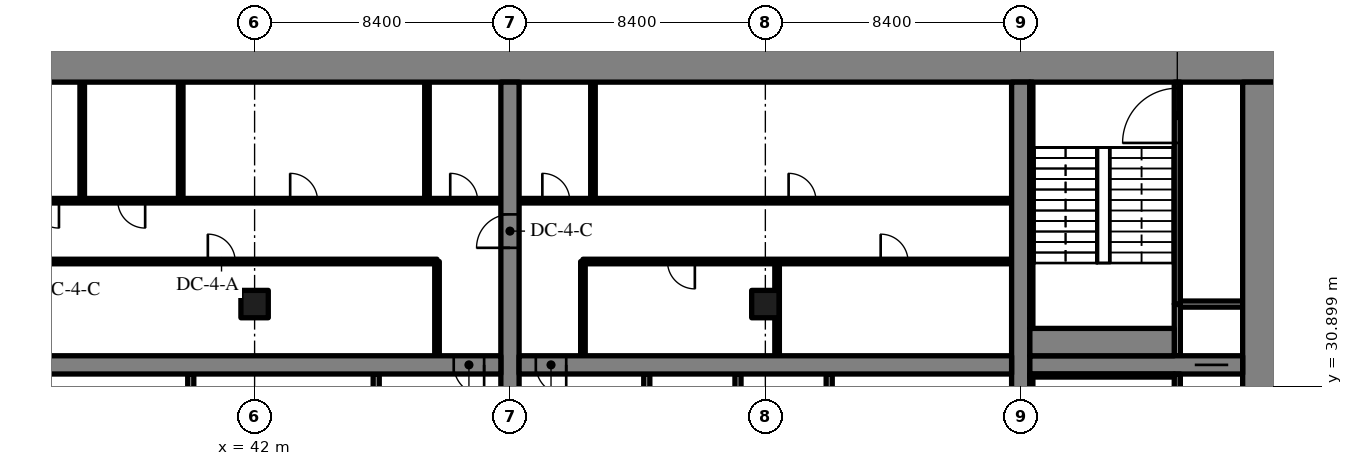
"""IFC4 building model, lengths in metres.
Left out: names, types, materials, properties, quantities, classifications, styles, units other than length and angle.
Written with IfcOpenShell. Run it as: python <this file> out.ifc"""

import sys

from ifc_helpers import new_model, si_unit, direction, frame, frame_2d, origin, origin_2d, place, context, subcontext, project, spatial, rectangle, extrude, source, transform, mapped, element, fill, save


model = new_model("IFC4")
c1 = context("Model", 3, precision=1e-05, world=origin(), true_north=direction((0.0, 1.0)))
c2 = subcontext(c1, "Body", "Model", "MODEL_VIEW")
j1 = project(units=[si_unit("LENGTHUNIT", "METRE"), si_unit("PLANEANGLEUNIT", "RADIAN")], contexts=[c1])
p1 = place(None, origin())
s1 = spatial("IfcSite", under=j1, at=p1, CompositionType="ELEMENT")
p2 = place(p1, origin())
s2 = spatial("IfcBuilding", under=s1, at=p2, CompositionType="ELEMENT")
p3 = place(p2, frame((0.0, 0.0, -9.0)))
s3 = spatial("IfcBuildingStorey", under=s2, at=p3, CompositionType="ELEMENT", Elevation=-9.0)
m1 = source(origin(), c2, "Body", "SweptSolid", [
    extrude(rectangle(XDim=50.4, YDim=1.1, at=frame_2d((25.2, 0.0))), origin(), (0.0, 0.0, 1.0), 4.22),
])
p4 = place(p3, frame((25.2, 41.45, 0.0), z_axis=(0.0, 0.0, 1.0), x_axis=(1.0, 0.0, 0.0)))
e1 = element("IfcWall", 1, at=p4, inside=s3, PredefinedType="SHEAR", context=c2, shape_type="MappedRepresentation", body=[
    mapped(m1, transform((0.0, 0.0, 0.0), scale=1.0)),
])
m2 = source(origin(), c2, "Body", "SweptSolid", [
    extrude(rectangle(XDim=17.8, YDim=1.1, at=frame_2d((8.9, 0.0))), origin(), (0.0, 0.0, 1.0), 4.22),
])
p5 = place(p3, frame((75.05, 23.1, 0.0), z_axis=(0.0, 0.0, 1.0), x_axis=(0.0, 1.0, 0.0)))
e2 = element("IfcWall", 2, at=p5, inside=s3, PredefinedType="SHEAR", context=c2, shape_type="MappedRepresentation", body=[
    mapped(m2, transform((0.0, 0.0, 0.0), scale=1.0)),
])
m3 = source(origin(), c2, "Body", "SweptSolid", [
    extrude(rectangle(XDim=17.8, YDim=0.6, at=frame_2d((8.9, 0.0))), origin(), (0.0, 0.0, 1.0), 4.22),
])
p6 = place(p3, frame((50.4, 23.1, 0.0), z_axis=(0.0, 0.0, 1.0), x_axis=(0.0, 1.0, 0.0)))
e3 = element("IfcWall", 3, at=p6, inside=s3, PredefinedType="SHEAR", context=c2, shape_type="MappedRepresentation", body=[
    mapped(m3, transform((0.0, 0.0, 0.0), scale=1.0)),
])
m4 = source(origin(), c2, "Body", "SweptSolid", [
    extrude(rectangle(XDim=1.1, YDim=2.1, at=frame_2d((0.55, 1.05))), frame((0.0, 0.31, 0.0), z_axis=(0.0, -1.0, 0.0), x_axis=(1.0, 0.0, 0.0)), (0.0, 0.0, 1.0), 0.62),
])
p7 = place(p6, frame((12.35, 0.0, 0.0)))
e4 = element("IfcOpeningElement", 4, at=p7, cuts=e3, PredefinedType="OPENING", context=c2, shape_type="MappedRepresentation", body=[
    mapped(m4, transform((0.0, 0.0, 0.0), scale=1.0)),
])
p8 = place(p3, frame((67.2, 23.1, 0.0), z_axis=(0.0, 0.0, 1.0), x_axis=(0.0, 1.0, 0.0)))
e5 = element("IfcWall", 5, at=p8, inside=s3, PredefinedType="SHEAR", context=c2, shape_type="MappedRepresentation", body=[
    mapped(m3, transform((0.0, 0.0, 0.0), scale=1.0)),
])
m5 = source(origin(), c2, "Body", "SweptSolid", [
    extrude(rectangle(XDim=16.2, YDim=0.6, at=frame_2d((8.1, 0.0))), origin(), (0.0, 0.0, 1.0), 4.22),
])
p9 = place(p3, frame((33.9, 31.6, 0.0), z_axis=(0.0, 0.0, 1.0), x_axis=(1.0, 0.0, 0.0)))
e6 = element("IfcWall", 6, at=p9, inside=s3, PredefinedType="SHEAR", context=c2, shape_type="MappedRepresentation", body=[
    mapped(m5, transform((0.0, 0.0, 0.0), scale=1.0)),
])
m6 = source(origin(), c2, "Body", "SweptSolid", [
    extrude(rectangle(XDim=1.0, YDim=2.1, at=frame_2d((0.5, 1.05))), frame((0.0, 0.31, 0.0), z_axis=(0.0, -1.0, 0.0), x_axis=(1.0, 0.0, 0.0)), (0.0, 0.0, 1.0), 0.62),
])
p10 = place(p9, frame((14.65, 0.0, 0.0)))
e7 = element("IfcOpeningElement", 7, at=p10, cuts=e6, PredefinedType="OPENING", context=c2, shape_type="MappedRepresentation", body=[
    mapped(m6, transform((0.0, 0.0, 0.0), scale=1.0)),
])
m7 = source(origin(), c2, "Body", "SweptSolid", [
    extrude(rectangle(XDim=16.2, YDim=0.6, at=frame_2d((8.1, 0.0))), origin(), (0.0, 0.0, 1.0), 4.22),
])
p11 = place(p3, frame((50.7, 31.6, 0.0), z_axis=(0.0, 0.0, 1.0), x_axis=(1.0, 0.0, 0.0)))
e8 = element("IfcWall", 8, at=p11, inside=s3, PredefinedType="SHEAR", context=c2, shape_type="MappedRepresentation", body=[
    mapped(m7, transform((0.0, 0.0, 0.0), scale=1.0)),
])
p12 = place(p11, frame((0.55, 0.0, 0.0)))
e9 = element("IfcOpeningElement", 9, at=p12, cuts=e8, PredefinedType="OPENING", context=c2, shape_type="MappedRepresentation", body=[
    mapped(m6, transform((0.0, 0.0, 0.0), scale=1.0)),
])
m8 = source(origin(), c2, "Body", "SweptSolid", [
    extrude(rectangle(XDim=7.0, YDim=0.6, at=frame_2d((3.5, 0.0))), origin(), (0.0, 0.0, 1.0), 4.22),
])
p13 = place(p3, frame((67.5, 31.6, 0.0), z_axis=(0.0, 0.0, 1.0), x_axis=(1.0, 0.0, 0.0)))
e10 = element("IfcWall", 10, at=p13, inside=s3, PredefinedType="SHEAR", context=c2, shape_type="MappedRepresentation", body=[
    mapped(m8, transform((0.0, 0.0, 0.0), scale=1.0)),
])
p14 = place(p13, frame((5.425, 0.0, 0.0)))
e11 = element("IfcOpeningElement", 11, at=p14, cuts=e10, PredefinedType="OPENING", context=c2, shape_type="MappedRepresentation", body=[
    mapped(m4, transform((0.0, 0.0, 0.0), scale=1.0)),
])
m9 = source(origin(), c2, "Body", "SweptSolid", [
    extrude(rectangle(XDim=0.9, YDim=0.9, at=origin_2d()), origin(), (0.0, 0.0, 1.0), 4.22),
])
for number, where, z_axis, x_axis in (
    (12, (42.0, 33.6, 0.0), (0.0, 0.0, 1.0), (1.0, 0.0, 0.0)),
    (13, (58.8, 33.6, 0.0), (0.0, 0.0, 1.0), (1.0, 0.0, 0.0)),
):
    element("IfcColumn", number, at=place(p3, frame(where, z_axis=z_axis, x_axis=x_axis)), inside=s3, PredefinedType="COLUMN", context=c2, shape_type="MappedRepresentation", body=[
        mapped(m9, transform((0.0, 0.0, 0.0), scale=1.0)),
    ])
m10 = source(origin(), c2, "Body", "SweptSolid", [
    extrude(rectangle(XDim=2.5, YDim=0.2, at=frame_2d((1.25, 0.0))), origin(), (0.0, 0.0, 1.0), 4.22),
])
p15 = place(p3, frame((46.0, 28.8, 0.0), z_axis=(0.0, 0.0, 1.0), x_axis=(0.0, 1.0, 0.0)))
e14 = element("IfcWall", 14, at=p15, inside=s3, PredefinedType="SOLIDWALL", context=c2, shape_type="MappedRepresentation", body=[
    mapped(m10, transform((0.0, 0.0, 0.0), scale=1.0)),
])
m11 = source(origin(), c2, "Body", "SweptSolid", [
    extrude(rectangle(XDim=2.4, YDim=0.2, at=frame_2d((1.2, 0.0))), origin(), (0.0, 0.0, 1.0), 4.22),
])
p16 = place(p3, frame((39.9, 28.9, 0.0), z_axis=(0.0, 0.0, 1.0), x_axis=(0.0, 1.0, 0.0)))
e15 = element("IfcWall", 15, at=p16, inside=s3, PredefinedType="PARTITIONING", context=c2, shape_type="MappedRepresentation", body=[
    mapped(m11, transform((0.0, 0.0, 0.0), scale=1.0)),
])
m12 = source(origin(), c2, "Body", "SweptSolid", [
    extrude(rectangle(XDim=3.1, YDim=0.15, at=frame_2d((1.55, 0.0))), origin(), (0.0, 0.0, 1.0), 4.22),
])
p17 = place(p3, frame((48.0, 31.9, 0.0), z_axis=(0.0, 0.0, 1.0), x_axis=(0.0, 1.0, 0.0)))
e16 = element("IfcWall", 16, at=p17, inside=s3, PredefinedType="PARTITIONING", context=c2, shape_type="MappedRepresentation", body=[
    mapped(m12, transform((0.0, 0.0, 0.0), scale=1.0)),
])
m13 = source(origin(), c2, "Body", "SweptSolid", [
    extrude(rectangle(XDim=14.1, YDim=0.15, at=frame_2d((7.05, 0.0))), origin(), (0.0, 0.0, 1.0), 4.22),
])
p18 = place(p3, frame((33.9, 35.0, 0.0), z_axis=(0.0, 0.0, 1.0), x_axis=(1.0, 0.0, 0.0)))
e17 = element("IfcWall", 17, at=p18, inside=s3, PredefinedType="PARTITIONING", context=c2, shape_type="MappedRepresentation", body=[
    mapped(m13, transform((0.0, 0.0, 0.0), scale=1.0)),
])
m14 = source(origin(), c2, "Body", "SweptSolid", [
    extrude(rectangle(XDim=0.9, YDim=2.1, at=frame_2d((0.45, 1.05))), frame((0.0, 0.085, 0.0), z_axis=(0.0, -1.0, 0.0), x_axis=(1.0, 0.0, 0.0)), (0.0, 0.0, 1.0), 0.17),
])
p19 = place(p18, frame((6.562, 0.0, 0.0)))
e18 = element("IfcOpeningElement", 18, at=p19, cuts=e17, PredefinedType="OPENING", context=c2, shape_type="MappedRepresentation", body=[
    mapped(m14, transform((0.0, 0.0, 0.0), scale=1.0)),
])
m15 = source(origin(), c2, "Body", "SweptSolid", [
    extrude(rectangle(XDim=16.2, YDim=0.15, at=frame_2d((8.1, 0.0))), origin(), (0.0, 0.0, 1.0), 4.22),
])
p20 = place(p3, frame((33.9, 37.0, 0.0), z_axis=(0.0, 0.0, 1.0), x_axis=(1.0, 0.0, 0.0)))
e19 = element("IfcWall", 19, at=p20, inside=s3, PredefinedType="PARTITIONING", context=c2, shape_type="MappedRepresentation", body=[
    mapped(m15, transform((0.0, 0.0, 0.0), scale=1.0)),
])
p21 = place(p20, frame((0.765, 0.0, 0.0)))
e20 = element("IfcOpeningElement", 20, at=p21, cuts=e19, PredefinedType="OPENING", context=c2, shape_type="MappedRepresentation", body=[
    mapped(m14, transform((0.0, 0.0, 0.0), scale=1.0)),
])
p22 = place(p20, frame((3.6, 0.0, 0.0)))
e21 = element("IfcOpeningElement", 21, at=p22, cuts=e19, PredefinedType="OPENING", context=c2, shape_type="MappedRepresentation", body=[
    mapped(m14, transform((0.0, 0.0, 0.0), scale=1.0)),
])
p23 = place(p20, frame((9.27, 0.0, 0.0)))
e22 = element("IfcOpeningElement", 22, at=p23, cuts=e19, PredefinedType="OPENING", context=c2, shape_type="MappedRepresentation", body=[
    mapped(m14, transform((0.0, 0.0, 0.0), scale=1.0)),
])
p24 = place(p20, frame((14.535, 0.0, 0.0)))
e23 = element("IfcOpeningElement", 23, at=p24, cuts=e19, PredefinedType="OPENING", context=c2, shape_type="MappedRepresentation", body=[
    mapped(m14, transform((0.0, 0.0, 0.0), scale=1.0)),
])
m16 = source(origin(), c2, "Body", "SweptSolid", [
    extrude(rectangle(XDim=3.9, YDim=0.15, at=frame_2d((1.95, 0.0))), origin(), (0.0, 0.0, 1.0), 4.22),
])
for number, where, z_axis, x_axis in (
    (24, (36.33, 37.0, 0.0), (0.0, 0.0, 1.0), (0.0, 1.0, 0.0)),
    (25, (39.57, 37.0, 0.0), (0.0, 0.0, 1.0), (0.0, 1.0, 0.0)),
    (26, (47.67, 37.0, 0.0), (0.0, 0.0, 1.0), (0.0, 1.0, 0.0)),
):
    element("IfcWall", number, at=place(p3, frame(where, z_axis=z_axis, x_axis=x_axis)), inside=s3, PredefinedType="PARTITIONING", context=c2, shape_type="MappedRepresentation", body=[
        mapped(m16, transform((0.0, 0.0, 0.0), scale=1.0)),
    ])
m17 = source(origin(), c2, "Body", "SweptSolid", [
    extrude(rectangle(XDim=8.2, YDim=0.2, at=frame_2d((4.1, 0.0))), origin(), (0.0, 0.0, 1.0), 4.22),
])
for number, where, z_axis, x_axis in (
    (27, (54.9, 23.1, 0.0), (0.0, 0.0, 1.0), (0.0, 1.0, 0.0)),
    (28, (60.9, 23.1, 0.0), (0.0, 0.0, 1.0), (0.0, 1.0, 0.0)),
    (29, (57.9, 23.1, 0.0), (0.0, 0.0, 1.0), (0.0, 1.0, 0.0)),
):
    element("IfcWall", number, at=place(p3, frame(where, z_axis=z_axis, x_axis=x_axis)), inside=s3, PredefinedType="PARTITIONING", context=c2, shape_type="MappedRepresentation", body=[
        mapped(m17, transform((0.0, 0.0, 0.0), scale=1.0)),
    ])
p25 = place(p3, frame((52.8, 31.9, 0.0), z_axis=(0.0, 0.0, 1.0), x_axis=(0.0, 1.0, 0.0)))
e30 = element("IfcWall", 30, at=p25, inside=s3, PredefinedType="PARTITIONING", context=c2, shape_type="MappedRepresentation", body=[
    mapped(m12, transform((0.0, 0.0, 0.0), scale=1.0)),
])
m18 = source(origin(), c2, "Body", "SweptSolid", [
    extrude(rectangle(XDim=14.1, YDim=0.15, at=frame_2d((7.05, 0.0))), origin(), (0.0, 0.0, 1.0), 4.22),
])
p26 = place(p3, frame((66.9, 35.0, 0.0), z_axis=(0.0, 0.0, 1.0), x_axis=(-1.0, 0.0, 0.0)))
e31 = element("IfcWall", 31, at=p26, inside=s3, PredefinedType="PARTITIONING", context=c2, shape_type="MappedRepresentation", body=[
    mapped(m18, transform((0.0, 0.0, 0.0), scale=1.0)),
])
p27 = place(p26, frame((3.407, 0.0, 0.0)))
e32 = element("IfcOpeningElement", 32, at=p27, cuts=e31, PredefinedType="OPENING", context=c2, shape_type="MappedRepresentation", body=[
    mapped(m14, transform((0.0, 0.0, 0.0), scale=1.0)),
])
p28 = place(p26, frame((10.419, 0.0, 0.0)))
e33 = element("IfcOpeningElement", 33, at=p28, cuts=e31, PredefinedType="OPENING", context=c2, shape_type="MappedRepresentation", body=[
    mapped(m14, transform((0.0, 0.0, 0.0), scale=1.0)),
])
m19 = source(origin(), c2, "Body", "SweptSolid", [
    extrude(rectangle(XDim=16.2, YDim=0.15, at=frame_2d((8.1, 0.0))), origin(), (0.0, 0.0, 1.0), 4.22),
])
p29 = place(p3, frame((66.9, 37.0, 0.0), z_axis=(0.0, 0.0, 1.0), x_axis=(-1.0, 0.0, 0.0)))
e34 = element("IfcWall", 34, at=p29, inside=s3, PredefinedType="PARTITIONING", context=c2, shape_type="MappedRepresentation", body=[
    mapped(m19, transform((0.0, 0.0, 0.0), scale=1.0)),
])
p30 = place(p29, frame((6.435, 0.0, 0.0)))
e35 = element("IfcOpeningElement", 35, at=p30, cuts=e34, PredefinedType="OPENING", context=c2, shape_type="MappedRepresentation", body=[
    mapped(m14, transform((0.0, 0.0, 0.0), scale=1.0)),
])
p31 = place(p29, frame((14.535, 0.0, 0.0)))
e36 = element("IfcOpeningElement", 36, at=p31, cuts=e34, PredefinedType="OPENING", context=c2, shape_type="MappedRepresentation", body=[
    mapped(m14, transform((0.0, 0.0, 0.0), scale=1.0)),
])
p32 = place(p3, frame((59.186, 31.9, 0.0), z_axis=(0.0, 0.0, 1.0), x_axis=(0.0, 1.0, 0.0)))
e37 = element("IfcWall", 37, at=p32, inside=s3, PredefinedType="PARTITIONING", context=c2, shape_type="MappedRepresentation", body=[
    mapped(m12, transform((0.0, 0.0, 0.0), scale=1.0)),
])
p33 = place(p3, frame((53.13, 37.0, 0.0), z_axis=(0.0, 0.0, 1.0), x_axis=(0.0, 1.0, 0.0)))
e38 = element("IfcWall", 38, at=p33, inside=s3, PredefinedType="PARTITIONING", context=c2, shape_type="MappedRepresentation", body=[
    mapped(m16, transform((0.0, 0.0, 0.0), scale=1.0)),
])
m20 = source(origin(), c2, "Body", "SweptSolid", [
    extrude(rectangle(XDim=8.2, YDim=0.2, at=frame_2d((4.1, 0.0))), origin(), (0.0, 0.0, 1.0), 4.22),
])
p34 = place(p3, frame((72.35, 23.1, 0.0), z_axis=(0.0, 0.0, 1.0), x_axis=(0.0, 1.0, 0.0)))
e39 = element("IfcWall", 39, at=p34, inside=s3, PredefinedType="SOLIDWALL", context=c2, shape_type="MappedRepresentation", body=[
    mapped(m20, transform((0.0, 0.0, 0.0), scale=1.0)),
])
m21 = source(origin(), c2, "Body", "SweptSolid", [
    extrude(rectangle(XDim=1.2, YDim=2.1, at=frame_2d((0.6, 1.05))), frame((0.0, 0.11, 0.0), z_axis=(0.0, -1.0, 0.0), x_axis=(1.0, 0.0, 0.0)), (0.0, 0.0, 1.0), 0.22),
])
p35 = place(p34, frame((6.4, 0.0, 0.0)))
e40 = element("IfcOpeningElement", 40, at=p35, cuts=e39, PredefinedType="OPENING", context=c2, shape_type="MappedRepresentation", body=[
    mapped(m21, transform((0.0, 0.0, 0.0), scale=1.0)),
])
m22 = source(origin(), c2, "Body", "SweptSolid", [
    extrude(rectangle(XDim=1.7, YDim=0.2, at=frame_2d((0.85, 0.0))), origin(), (0.0, 0.0, 1.0), 4.22),
])
p36 = place(p3, frame((72.35, 31.9, 0.0), z_axis=(0.0, 0.0, 1.0), x_axis=(0.0, 1.0, 0.0)))
e41 = element("IfcWall", 41, at=p36, inside=s3, PredefinedType="SOLIDWALL", context=c2, shape_type="MappedRepresentation", body=[
    mapped(m22, transform((0.0, 0.0, 0.0), scale=1.0)),
])
m23 = source(origin(), c2, "Body", "SweptSolid", [
    extrude(rectangle(XDim=2.05, YDim=0.2, at=frame_2d((1.025, 0.0))), origin(), (0.0, 0.0, 1.0), 4.22),
])
p37 = place(p3, frame((72.45, 33.6, 0.0), z_axis=(0.0, 0.0, 1.0), x_axis=(1.0, 0.0, 0.0)))
e42 = element("IfcWall", 42, at=p37, inside=s3, PredefinedType="SOLIDWALL", context=c2, shape_type="MappedRepresentation", body=[
    mapped(m23, transform((0.0, 0.0, 0.0), scale=1.0)),
])
m24 = source(origin(), c2, "Body", "SweptSolid", [
    extrude(rectangle(XDim=7.3, YDim=0.2, at=frame_2d((3.65, 0.0))), origin(), (0.0, 0.0, 1.0), 4.22),
])
p38 = place(p3, frame((72.35, 33.6, 0.0), z_axis=(0.0, 0.0, 1.0), x_axis=(0.0, 1.0, 0.0)))
e43 = element("IfcWall", 43, at=p38, inside=s3, PredefinedType="SOLIDWALL", context=c2, shape_type="MappedRepresentation", body=[
    mapped(m24, transform((0.0, 0.0, 0.0), scale=1.0)),
])
m25 = source(origin(), c2, "Body", "SweptSolid", [
    extrude(rectangle(XDim=1.8, YDim=2.1, at=frame_2d((0.9, 1.05))), frame((0.0, 0.11, 0.0), z_axis=(0.0, -1.0, 0.0), x_axis=(1.0, 0.0, 0.0)), (0.0, 0.0, 1.0), 0.22),
])
p39 = place(p38, frame((5.3, 0.0, 0.0)))
e44 = element("IfcOpeningElement", 44, at=p39, cuts=e43, PredefinedType="OPENING", context=c2, shape_type="MappedRepresentation", body=[
    mapped(m25, transform((0.0, 0.0, 0.0), scale=1.0)),
])
m26 = source(origin(), c2, "Body", "SweptSolid", [
    extrude(rectangle(XDim=4.75, YDim=0.1, at=frame_2d((2.375, 0.0))), origin(), (0.0, 0.0, 1.0), 4.22),
])
p40 = place(p3, frame((67.5, 31.25, 0.0), z_axis=(0.0, 0.0, 1.0), x_axis=(1.0, 0.0, 0.0)))
e45 = element("IfcWall", 45, at=p40, inside=s3, PredefinedType="SOLIDWALL", context=c2, shape_type="MappedRepresentation", body=[
    mapped(m26, transform((0.0, 0.0, 0.0), scale=1.0)),
])
m27 = source(origin(), c2, "Body", "SweptSolid", [
    extrude(rectangle(XDim=8.1, YDim=0.1, at=frame_2d((4.05, 0.0))), origin(), (0.0, 0.0, 1.0), 4.22),
])
p41 = place(p3, frame((67.55, 23.1, 0.0), z_axis=(0.0, 0.0, 1.0), x_axis=(0.0, 1.0, 0.0)))
e46 = element("IfcWall", 46, at=p41, inside=s3, PredefinedType="SOLIDWALL", context=c2, shape_type="MappedRepresentation", body=[
    mapped(m27, transform((0.0, 0.0, 0.0), scale=1.0)),
])
m28 = source(origin(), c2, "Body", "SweptSolid", [
    extrude(rectangle(XDim=4.75, YDim=0.9, at=frame_2d((2.375, 0.0))), origin(), (0.0, 0.0, 1.0), 4.22),
])
p42 = place(p3, frame((67.5, 32.35, 0.0), z_axis=(0.0, 0.0, 1.0), x_axis=(1.0, 0.0, 0.0)))
e47 = element("IfcWall", 47, at=p42, inside=s3, PredefinedType="SOLIDWALL", context=c2, shape_type="MappedRepresentation", body=[
    mapped(m28, transform((0.0, 0.0, 0.0), scale=1.0)),
])
p43 = place(p3, frame((67.55, 32.8, 0.0), z_axis=(0.0, 0.0, 1.0), x_axis=(0.0, 1.0, 0.0)))
e48 = element("IfcWall", 48, at=p43, inside=s3, PredefinedType="SOLIDWALL", context=c2, shape_type="MappedRepresentation", body=[
    mapped(m27, transform((0.0, 0.0, 0.0), scale=1.0)),
])
m29 = source(origin(), c2, "Body", "SweptSolid", [
    extrude(rectangle(XDim=1.0, YDim=2.1, at=frame_2d((0.5, 1.05))), frame((0.0, 0.025, 0.0), z_axis=(0.0, -1.0, 0.0), x_axis=(1.0, 0.0, 0.0)), (0.0, 0.0, 1.0), 0.05),
])
p44 = place(p10, origin())
e49 = element("IfcDoor", 49, at=p44, inside=s3, OperationType="SINGLE_SWING_RIGHT", PredefinedType="DOOR", context=c2, shape_type="MappedRepresentation", body=[
    mapped(m29, transform((0.0, 0.0, 0.0), scale=1.0)),
])
fill(e7, e49)
m30 = source(origin(), c2, "Body", "SweptSolid", [
    extrude(rectangle(XDim=0.9, YDim=2.1, at=frame_2d((0.45, 1.05))), frame((0.0, 0.025, 0.0), z_axis=(0.0, -1.0, 0.0), x_axis=(1.0, 0.0, 0.0)), (0.0, 0.0, 1.0), 0.05),
])
p45 = place(p19, origin())
e50 = element("IfcDoor", 50, at=p45, inside=s3, OperationType="SINGLE_SWING_LEFT", PredefinedType="DOOR", context=c2, shape_type="MappedRepresentation", body=[
    mapped(m30, transform((0.0, 0.0, 0.0), scale=1.0)),
])
fill(e18, e50)
p46 = place(p21, origin())
e51 = element("IfcDoor", 51, at=p46, inside=s3, OperationType="SINGLE_SWING_RIGHT", PredefinedType="DOOR", context=c2, shape_type="MappedRepresentation", body=[
    mapped(m30, transform((0.0, 0.0, 0.0), scale=1.0)),
])
fill(e20, e51)
p47 = place(p22, origin())
e52 = element("IfcDoor", 52, at=p47, inside=s3, OperationType="SINGLE_SWING_RIGHT", PredefinedType="DOOR", context=c2, shape_type="MappedRepresentation", body=[
    mapped(m30, transform((0.0, 0.0, 0.0), scale=1.0)),
])
fill(e21, e52)
p48 = place(p23, origin())
e53 = element("IfcDoor", 53, at=p48, inside=s3, OperationType="SINGLE_SWING_LEFT", PredefinedType="DOOR", context=c2, shape_type="MappedRepresentation", body=[
    mapped(m30, transform((0.0, 0.0, 0.0), scale=1.0)),
])
fill(e22, e53)
p49 = place(p24, origin())
e54 = element("IfcDoor", 54, at=p49, inside=s3, OperationType="SINGLE_SWING_LEFT", PredefinedType="DOOR", context=c2, shape_type="MappedRepresentation", body=[
    mapped(m30, transform((0.0, 0.0, 0.0), scale=1.0)),
])
fill(e23, e54)
p50 = place(p12, origin())
e55 = element("IfcDoor", 55, at=p50, inside=s3, OperationType="SINGLE_SWING_RIGHT", PredefinedType="DOOR", context=c2, shape_type="MappedRepresentation", body=[
    mapped(m29, transform((0.0, 0.0, 0.0), scale=1.0)),
])
fill(e9, e55)
p51 = place(p27, origin())
e56 = element("IfcDoor", 56, at=p51, inside=s3, OperationType="SINGLE_SWING_RIGHT", PredefinedType="DOOR", context=c2, shape_type="MappedRepresentation", body=[
    mapped(m30, transform((0.0, 0.0, 0.0), scale=1.0)),
])
fill(e32, e56)
p52 = place(p28, origin())
e57 = element("IfcDoor", 57, at=p52, inside=s3, OperationType="SINGLE_SWING_LEFT", PredefinedType="DOOR", context=c2, shape_type="MappedRepresentation", body=[
    mapped(m30, transform((0.0, 0.0, 0.0), scale=1.0)),
])
fill(e33, e57)
p53 = place(p30, origin())
e58 = element("IfcDoor", 58, at=p53, inside=s3, OperationType="SINGLE_SWING_RIGHT", PredefinedType="DOOR", context=c2, shape_type="MappedRepresentation", body=[
    mapped(m30, transform((0.0, 0.0, 0.0), scale=1.0)),
])
fill(e35, e58)
p54 = place(p31, origin())
e59 = element("IfcDoor", 59, at=p54, inside=s3, OperationType="SINGLE_SWING_RIGHT", PredefinedType="DOOR", context=c2, shape_type="MappedRepresentation", body=[
    mapped(m30, transform((0.0, 0.0, 0.0), scale=1.0)),
])
fill(e36, e59)
m31 = source(origin(), c2, "Body", "SweptSolid", [
    extrude(rectangle(XDim=1.1, YDim=2.1, at=frame_2d((0.55, 1.05))), frame((0.0, 0.025, 0.0), z_axis=(0.0, -1.0, 0.0), x_axis=(1.0, 0.0, 0.0)), (0.0, 0.0, 1.0), 0.05),
])
p55 = place(p14, origin())
e60 = element("IfcDoor", 60, at=p55, inside=s3, OperationType="SLIDING_TO_RIGHT", PredefinedType="DOOR", context=c2, shape_type="MappedRepresentation", body=[
    mapped(m31, transform((0.0, 0.0, 0.0), scale=1.0)),
])
fill(e11, e60)
m32 = source(origin(), c2, "Body", "SweptSolid", [
    extrude(rectangle(XDim=1.8, YDim=2.1, at=frame_2d((0.9, 1.05))), frame((0.0, 0.025, 0.0), z_axis=(0.0, -1.0, 0.0), x_axis=(1.0, 0.0, 0.0)), (0.0, 0.0, 1.0), 0.05),
])
p56 = place(p39, origin())
e61 = element("IfcDoor", 61, at=p56, inside=s3, OperationType="SINGLE_SWING_LEFT", PredefinedType="DOOR", context=c2, shape_type="MappedRepresentation", body=[
    mapped(m32, transform((0.0, 0.0, 0.0), scale=1.0)),
])
fill(e44, e61)
p57 = place(p7, origin())
e62 = element("IfcDoor", 62, at=p57, inside=s3, OperationType="SINGLE_SWING_LEFT", PredefinedType="DOOR", context=c2, shape_type="MappedRepresentation", body=[
    mapped(m31, transform((0.0, 0.0, 0.0), scale=1.0)),
])
fill(e4, e62)
save(model, sys.argv[1])
